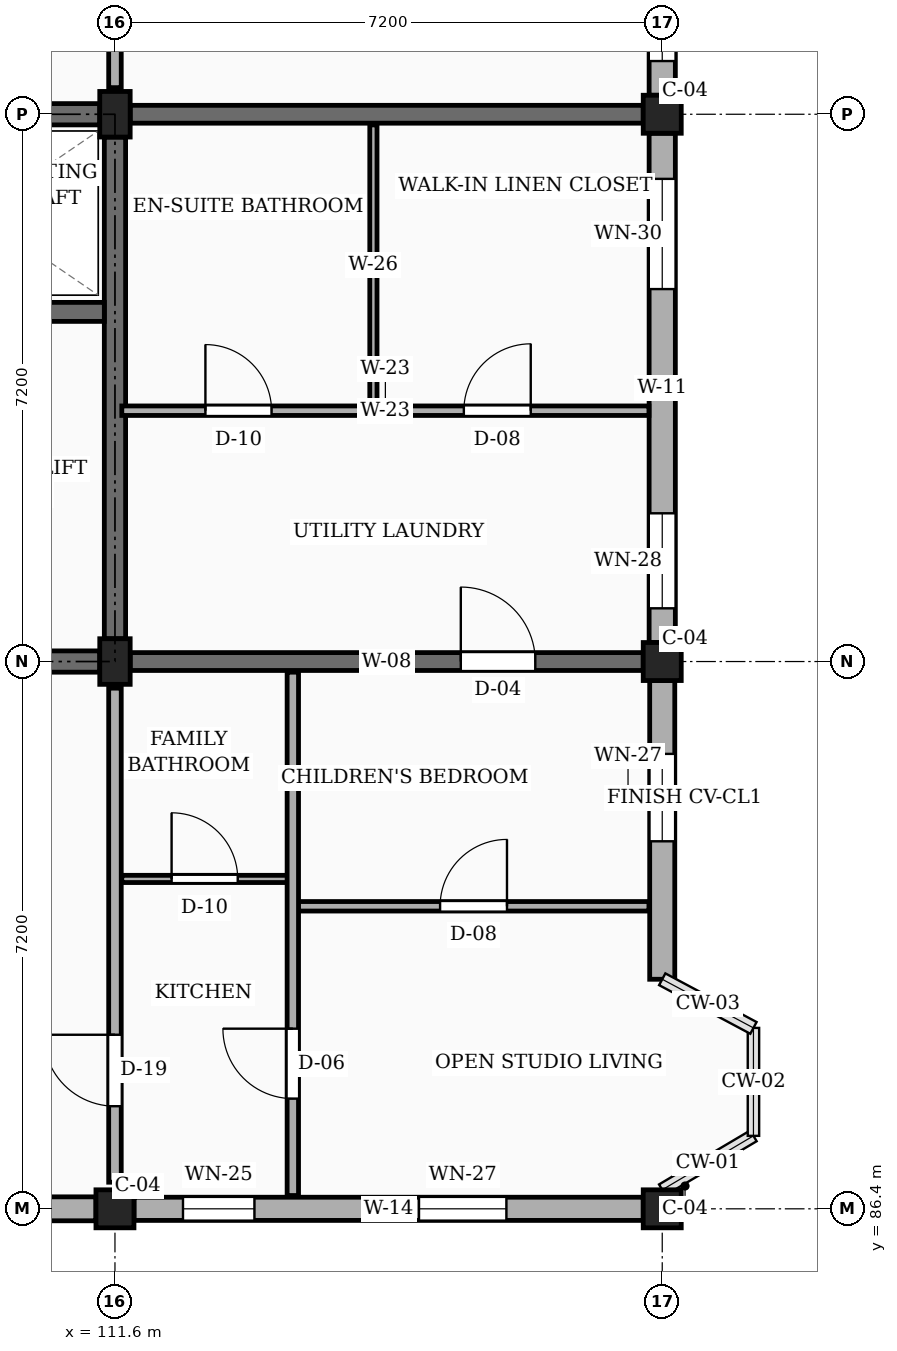
"""IFC4 building model, lengths in metres.
Left out: names, types, materials, properties, quantities, classifications, styles, units other than length and angle.
Written with IfcOpenShell. Run it as: python <this file> out.ifc"""

import sys

from ifc_helpers import new_model, si_unit, direction, frame, frame_2d, origin, origin_2d, place, context, subcontext, project, spatial, rectangle, extrude, element, fill, save


model = new_model("IFC4")
c1 = context("Model", 3, precision=1e-05, world=origin(), true_north=direction((0.0, 1.0)))
c2 = subcontext(c1, "Body", "Model", "MODEL_VIEW")
j1 = project(units=[si_unit("LENGTHUNIT", "METRE"), si_unit("PLANEANGLEUNIT", "RADIAN")], contexts=[c1])
p1 = place(None, origin())
s1 = spatial("IfcSite", under=j1, at=p1, CompositionType="ELEMENT")
p2 = place(p1, origin())
s2 = spatial("IfcBuilding", under=s1, at=p2, CompositionType="ELEMENT")
p3 = place(p2, frame((0.0, 0.0, 23.4)))
s3 = spatial("IfcBuildingStorey", under=s2, at=p3, CompositionType="ELEMENT", Elevation=23.4)
p4 = place(p3, frame((111.6, 86.4, 0.0), z_axis=(0.0, 0.0, 1.0), x_axis=(1.0, 0.0, 0.0)))
e1 = element("IfcColumn", 1, at=p4, inside=s3, PredefinedType="COLUMN", context=c2, shape_type="SweptSolid", body=[
    extrude(rectangle(XDim=0.5, YDim=0.5, at=origin_2d()), origin(), (0.0, 0.0, 1.0), 3.15),
])
for number, where, z_axis, x_axis in (
    (2, (111.6, 93.6, 0.0), (0.0, 0.0, 1.0), (1.0, 0.0, 0.0)),
    (3, (111.6, 100.8, 0.0), (0.0, 0.0, 1.0), (1.0, 0.0, 0.0)),
):
    element("IfcColumn", number, at=place(p3, frame(where, z_axis=z_axis, x_axis=x_axis)), inside=s3, PredefinedType="COLUMN", context=c2, shape_type="SweptSolid", body=[
        extrude(rectangle(XDim=0.4, YDim=0.6, at=origin_2d()), origin(), (0.0, 0.0, 1.0), 3.15),
    ])
for number, where, z_axis, x_axis in (
    (4, (118.8, 86.4, 0.0), (0.0, 0.0, 1.0), (1.0, 0.0, 0.0)),
    (5, (118.8, 93.6, 0.0), (0.0, 0.0, 1.0), (1.0, 0.0, 0.0)),
    (6, (118.8, 100.8, 0.0), (0.0, 0.0, 1.0), (1.0, 0.0, 0.0)),
):
    element("IfcColumn", number, at=place(p3, frame(where, z_axis=z_axis, x_axis=x_axis)), inside=s3, PredefinedType="COLUMN", context=c2, shape_type="SweptSolid", body=[
        extrude(rectangle(XDim=0.5, YDim=0.5, at=origin_2d()), origin(), (0.0, 0.0, 1.0), 3.15),
    ])
p5 = place(p3, frame((111.8, 93.6, 0.0), z_axis=(0.0, 0.0, 1.0), x_axis=(1.0, 0.0, 0.0)))
e7 = element("IfcWall", 7, at=p5, inside=s3, PredefinedType="SOLIDWALL", context=c2, shape_type="SweptSolid", body=[
    extrude(rectangle(XDim=6.75, YDim=0.235, at=frame_2d((3.375, 0.0))), origin(), (0.0, 0.0, 1.0), 2.19),
])
p6 = place(p5, frame((4.35, 0.0, 0.0)))
e8 = element("IfcOpeningElement", 8, at=p6, cuts=e7, PredefinedType="OPENING", context=c2, shape_type="SweptSolid", body=[
    extrude(rectangle(XDim=0.98, YDim=2.12, at=frame_2d((0.49, 1.06))), frame((0.0, 0.127, 0.0), z_axis=(0.0, -1.0, 0.0), x_axis=(1.0, 0.0, 0.0)), (0.0, 0.0, 1.0), 0.255),
])
p7 = place(p3, frame((111.8, 100.8, 0.0), z_axis=(0.0, 0.0, 1.0), x_axis=(1.0, 0.0, 0.0)))
e9 = element("IfcWall", 9, at=p7, inside=s3, PredefinedType="SOLIDWALL", context=c2, shape_type="SweptSolid", body=[
    extrude(rectangle(XDim=6.75, YDim=0.235, at=frame_2d((3.375, 0.0))), origin(), (0.0, 0.0, 1.0), 2.19),
])
p8 = place(p3, frame((104.65, 86.4, 0.0), z_axis=(0.0, 0.0, 1.0), x_axis=(1.0, 0.0, 0.0)))
e10 = element("IfcWall", 10, at=p8, inside=s3, PredefinedType="SOLIDWALL", context=c2, shape_type="SweptSolid", body=[
    extrude(rectangle(XDim=6.7, YDim=0.315, at=frame_2d((3.35, 0.0))), origin(), (0.0, 0.0, 1.0), 2.46),
])
p9 = place(p8, frame((0.45, 0.0, 0.78)))
e11 = element("IfcOpeningElement", 11, at=p9, cuts=e10, PredefinedType="OPENING", context=c2, shape_type="SweptSolid", body=[
    extrude(rectangle(XDim=1.38, YDim=1.36, at=frame_2d((0.69, 0.68))), frame((0.0, 0.167, 0.0), z_axis=(0.0, -1.0, 0.0), x_axis=(1.0, 0.0, 0.0)), (0.0, 0.0, 1.0), 0.335),
])
p10 = place(p8, frame((4.65, 0.0, 0.78)))
e12 = element("IfcOpeningElement", 12, at=p10, cuts=e10, PredefinedType="OPENING", context=c2, shape_type="SweptSolid", body=[
    extrude(rectangle(XDim=0.94, YDim=1.44, at=frame_2d((0.47, 0.72))), frame((0.0, 0.167, 0.0), z_axis=(0.0, -1.0, 0.0), x_axis=(1.0, 0.0, 0.0)), (0.0, 0.0, 1.0), 0.335),
])
p11 = place(p3, frame((111.85, 86.4, 0.0), z_axis=(0.0, 0.0, 1.0), x_axis=(1.0, 0.0, 0.0)))
e13 = element("IfcWall", 13, at=p11, inside=s3, PredefinedType="SOLIDWALL", context=c2, shape_type="SweptSolid", body=[
    extrude(rectangle(XDim=6.7, YDim=0.305, at=frame_2d((3.35, 0.0))), origin(), (0.0, 0.0, 1.0), 2.46),
])
p12 = place(p11, frame((0.645, 0.0, 0.78)))
e14 = element("IfcOpeningElement", 14, at=p12, cuts=e13, PredefinedType="OPENING", context=c2, shape_type="SweptSolid", body=[
    extrude(rectangle(XDim=0.94, YDim=1.44, at=frame_2d((0.47, 0.72))), frame((0.0, 0.163, 0.0), z_axis=(0.0, -1.0, 0.0), x_axis=(1.0, 0.0, 0.0)), (0.0, 0.0, 1.0), 0.325),
])
p13 = place(p11, frame((3.75, 0.0, 0.78)))
e15 = element("IfcOpeningElement", 15, at=p13, cuts=e13, PredefinedType="OPENING", context=c2, shape_type="SweptSolid", body=[
    extrude(rectangle(XDim=1.15, YDim=1.44, at=frame_2d((0.575, 0.72))), frame((0.0, 0.163, 0.0), z_axis=(0.0, -1.0, 0.0), x_axis=(1.0, 0.0, 0.0)), (0.0, 0.0, 1.0), 0.325),
])
p14 = place(p3, frame((118.8, 89.42, 0.0), z_axis=(0.0, 0.0, 1.0), x_axis=(0.0, 1.0, 0.0)))
e16 = element("IfcWall", 16, at=p14, inside=s3, PredefinedType="SOLIDWALL", context=c2, shape_type="SweptSolid", body=[
    extrude(rectangle(XDim=3.93, YDim=0.33, at=frame_2d((1.965, 0.0))), origin(), (0.0, 0.0, 1.0), 2.46),
])
p15 = place(p14, frame((1.815, 0.0, 0.78)))
e17 = element("IfcOpeningElement", 17, at=p15, cuts=e16, PredefinedType="OPENING", context=c2, shape_type="SweptSolid", body=[
    extrude(rectangle(XDim=1.15, YDim=1.44, at=frame_2d((0.575, 0.72))), frame((0.0, 0.175, 0.0), z_axis=(0.0, -1.0, 0.0), x_axis=(1.0, 0.0, 0.0)), (0.0, 0.0, 1.0), 0.35),
])
p16 = place(p3, frame((118.8, 93.85, 0.0), z_axis=(0.0, 0.0, 1.0), x_axis=(0.0, 1.0, 0.0)))
e18 = element("IfcWall", 18, at=p16, inside=s3, PredefinedType="SOLIDWALL", context=c2, shape_type="SweptSolid", body=[
    extrude(rectangle(XDim=6.7, YDim=0.345, at=frame_2d((3.35, 0.0))), origin(), (0.0, 0.0, 1.0), 2.46),
])
p17 = place(p16, frame((0.45, 0.0, 0.78)))
e19 = element("IfcOpeningElement", 19, at=p17, cuts=e18, PredefinedType="OPENING", context=c2, shape_type="SweptSolid", body=[
    extrude(rectangle(XDim=1.25, YDim=1.44, at=frame_2d((0.625, 0.72))), frame((0.0, 0.183, 0.0), z_axis=(0.0, -1.0, 0.0), x_axis=(1.0, 0.0, 0.0)), (0.0, 0.0, 1.0), 0.365),
])
p18 = place(p16, frame((4.65, 0.0, 0.78)))
e20 = element("IfcOpeningElement", 20, at=p18, cuts=e18, PredefinedType="OPENING", context=c2, shape_type="SweptSolid", body=[
    extrude(rectangle(XDim=1.45, YDim=1.44, at=frame_2d((0.725, 0.72))), frame((0.0, 0.183, 0.0), z_axis=(0.0, -1.0, 0.0), x_axis=(1.0, 0.0, 0.0)), (0.0, 0.0, 1.0), 0.365),
])
p19 = place(p3, frame((118.8, 101.05, 0.0), z_axis=(0.0, 0.0, 1.0), x_axis=(0.0, 1.0, 0.0)))
e21 = element("IfcWall", 21, at=p19, inside=s3, PredefinedType="SOLIDWALL", context=c2, shape_type="SweptSolid", body=[
    extrude(rectangle(XDim=6.7, YDim=0.345, at=frame_2d((3.35, 0.0))), origin(), (0.0, 0.0, 1.0), 2.46),
])
p20 = place(p19, frame((0.45, 0.0, 0.78)))
e22 = element("IfcOpeningElement", 22, at=p20, cuts=e21, PredefinedType="OPENING", context=c2, shape_type="SweptSolid", body=[
    extrude(rectangle(XDim=1.45, YDim=1.44, at=frame_2d((0.725, 0.72))), frame((0.0, 0.183, 0.0), z_axis=(0.0, -1.0, 0.0), x_axis=(1.0, 0.0, 0.0)), (0.0, 0.0, 1.0), 0.365),
])
p21 = place(p19, frame((4.65, 0.0, 0.78)))
e23 = element("IfcOpeningElement", 23, at=p21, cuts=e21, PredefinedType="OPENING", context=c2, shape_type="SweptSolid", body=[
    extrude(rectangle(XDim=0.92, YDim=1.15, at=frame_2d((0.46, 0.575))), frame((0.0, 0.183, 0.0), z_axis=(0.0, -1.0, 0.0), x_axis=(1.0, 0.0, 0.0)), (0.0, 0.0, 1.0), 0.365),
])
p22 = place(p3, frame((104.6, 100.8, 0.0), z_axis=(0.0, 0.0, 1.0), x_axis=(1.0, 0.0, 0.0)))
e24 = element("IfcWall", 24, at=p22, inside=s3, PredefinedType="SHEAR", context=c2, shape_type="SweptSolid", body=[
    extrude(rectangle(XDim=6.8, YDim=0.28, at=frame_2d((3.4, 0.0))), origin(), (0.0, 0.0, 1.0), 2.89),
])
p23 = place(p3, frame((111.6, 93.9, 0.0), z_axis=(0.0, 0.0, 1.0), x_axis=(0.0, 1.0, 0.0)))
e25 = element("IfcWall", 25, at=p23, inside=s3, PredefinedType="SHEAR", context=c2, shape_type="SweptSolid", body=[
    extrude(rectangle(XDim=6.6, YDim=0.28, at=frame_2d((3.3, 0.0))), origin(), (0.0, 0.0, 1.0), 2.89),
])
p24 = place(p3, frame((104.6, 93.6, 0.0), z_axis=(0.0, 0.0, 1.0), x_axis=(1.0, 0.0, 0.0)))
e26 = element("IfcWall", 26, at=p24, inside=s3, PredefinedType="SHEAR", context=c2, shape_type="SweptSolid", body=[
    extrude(rectangle(XDim=6.8, YDim=0.28, at=frame_2d((3.4, 0.0))), origin(), (0.0, 0.0, 1.0), 2.89),
])
p25 = place(p24, frame((4.55, 0.0, 0.0)))
e27 = element("IfcOpeningElement", 27, at=p25, cuts=e26, PredefinedType="OPENING", context=c2, shape_type="SweptSolid", body=[
    extrude(rectangle(XDim=1.1, YDim=2.15, at=frame_2d((0.55, 1.075))), frame((0.0, 0.15, 0.0), z_axis=(0.0, -1.0, 0.0), x_axis=(1.0, 0.0, 0.0)), (0.0, 0.0, 1.0), 0.3),
])
p26 = place(p3, frame((108.125, 98.2, 0.0), z_axis=(0.0, 0.0, 1.0), x_axis=(1.0, 0.0, 0.0)))
e28 = element("IfcWall", 28, at=p26, inside=s3, PredefinedType="SHEAR", context=c2, shape_type="SweptSolid", body=[
    extrude(rectangle(XDim=3.335, YDim=0.25, at=frame_2d((1.667, 0.0))), origin(), (0.0, 0.0, 1.0), 2.89),
])
p27 = place(p26, frame((1.1, 0.0, 0.0)))
e29 = element("IfcOpeningElement", 29, at=p27, cuts=e28, PredefinedType="OPENING", context=c2, shape_type="SweptSolid", body=[
    extrude(rectangle(XDim=1.1, YDim=2.2, at=frame_2d((0.55, 1.1))), frame((0.0, 0.135, 0.0), z_axis=(0.0, -1.0, 0.0), x_axis=(1.0, 0.0, 0.0)), (0.0, 0.0, 1.0), 0.27),
])
p28 = place(p3, frame((111.6, 86.75, 0.0), z_axis=(0.0, 0.0, 1.0), x_axis=(0.0, 1.0, 0.0)))
e30 = element("IfcWall", 30, at=p28, inside=s3, PredefinedType="PARTITIONING", context=c2, shape_type="SweptSolid", body=[
    extrude(rectangle(XDim=6.5, YDim=0.165, at=frame_2d((3.25, 0.0))), origin(), (0.0, 0.0, 1.0), 2.325),
])
p29 = place(p28, frame((1.0, 0.0, 0.0)))
e31 = element("IfcOpeningElement", 31, at=p29, cuts=e30, PredefinedType="OPENING", context=c2, shape_type="SweptSolid", body=[
    extrude(rectangle(XDim=0.94, YDim=2.12, at=frame_2d((0.47, 1.06))), frame((0.0, 0.093, 0.0), z_axis=(0.0, -1.0, 0.0), x_axis=(1.0, 0.0, 0.0)), (0.0, 0.0, 1.0), 0.185),
])
p30 = place(p3, frame((111.6, 101.15, 0.0), z_axis=(0.0, 0.0, 1.0), x_axis=(0.0, 1.0, 0.0)))
e32 = element("IfcWall", 32, at=p30, inside=s3, PredefinedType="PARTITIONING", context=c2, shape_type="SweptSolid", body=[
    extrude(rectangle(XDim=6.5, YDim=0.165, at=frame_2d((3.25, 0.0))), origin(), (0.0, 0.0, 1.0), 2.325),
])
p31 = place(p30, frame((1.1, 0.0, 0.0)))
e33 = element("IfcOpeningElement", 33, at=p31, cuts=e32, PredefinedType="OPENING", context=c2, shape_type="SweptSolid", body=[
    extrude(rectangle(XDim=1.14, YDim=2.18, at=frame_2d((0.57, 1.09))), frame((0.0, 0.093, 0.0), z_axis=(0.0, -1.0, 0.0), x_axis=(1.0, 0.0, 0.0)), (0.0, 0.0, 1.0), 0.185),
])
p32 = place(p3, frame((114.01, 90.38, 0.0), z_axis=(0.0, 0.0, 1.0), x_axis=(1.0, 0.0, 0.0)))
e34 = element("IfcWall", 34, at=p32, inside=s3, PredefinedType="PARTITIONING", context=c2, shape_type="SweptSolid", body=[
    extrude(rectangle(XDim=4.615, YDim=0.125, at=frame_2d((2.308, 0.0))), origin(), (0.0, 0.0, 1.0), 2.325),
])
p33 = place(p32, frame((1.867, 0.0, 0.0)))
e35 = element("IfcOpeningElement", 35, at=p33, cuts=e34, PredefinedType="OPENING", context=c2, shape_type="SweptSolid", body=[
    extrude(rectangle(XDim=0.88, YDim=2.08, at=frame_2d((0.44, 1.04))), frame((0.0, 0.073, 0.0), z_axis=(0.0, -1.0, 0.0), x_axis=(1.0, 0.0, 0.0)), (0.0, 0.0, 1.0), 0.145),
])
p34 = place(p3, frame((111.69, 90.74, 0.0), z_axis=(0.0, 0.0, 1.0), x_axis=(1.0, 0.0, 0.0)))
e36 = element("IfcWall", 36, at=p34, inside=s3, PredefinedType="PARTITIONING", context=c2, shape_type="SweptSolid", body=[
    extrude(rectangle(XDim=2.18, YDim=0.095, at=frame_2d((1.09, 0.0))), origin(), (0.0, 0.0, 1.0), 2.325),
])
p35 = place(p34, frame((0.655, 0.0, 0.0)))
e37 = element("IfcOpeningElement", 37, at=p35, cuts=e36, PredefinedType="OPENING", context=c2, shape_type="SweptSolid", body=[
    extrude(rectangle(XDim=0.87, YDim=2.05, at=frame_2d((0.435, 1.025))), frame((0.0, 0.058, 0.0), z_axis=(0.0, -1.0, 0.0), x_axis=(1.0, 0.0, 0.0)), (0.0, 0.0, 1.0), 0.115),
])
p36 = place(p3, frame((113.94, 86.575, 0.0), z_axis=(0.0, 0.0, 1.0), x_axis=(0.0, 1.0, 0.0)))
e38 = element("IfcWall", 38, at=p36, inside=s3, PredefinedType="PARTITIONING", context=c2, shape_type="SweptSolid", body=[
    extrude(rectangle(XDim=6.885, YDim=0.15, at=frame_2d((3.442, 0.0))), origin(), (0.0, 0.0, 1.0), 2.325),
])
p37 = place(p36, frame((1.275, 0.0, 0.0)))
e39 = element("IfcOpeningElement", 39, at=p37, cuts=e38, PredefinedType="OPENING", context=c2, shape_type="SweptSolid", body=[
    extrude(rectangle(XDim=0.92, YDim=2.1, at=frame_2d((0.46, 1.05))), frame((0.0, 0.085, 0.0), z_axis=(0.0, -1.0, 0.0), x_axis=(1.0, 0.0, 0.0)), (0.0, 0.0, 1.0), 0.17),
])
p38 = place(p3, frame((111.69, 96.9, 0.0), z_axis=(0.0, 0.0, 1.0), x_axis=(1.0, 0.0, 0.0)))
e40 = element("IfcWall", 40, at=p38, inside=s3, PredefinedType="PARTITIONING", context=c2, shape_type="SweptSolid", body=[
    extrude(rectangle(XDim=6.935, YDim=0.125, at=frame_2d((3.468, 0.0))), origin(), (0.0, 0.0, 1.0), 2.325),
])
p39 = place(p38, frame((1.1, 0.0, 0.0)))
e41 = element("IfcOpeningElement", 41, at=p39, cuts=e40, PredefinedType="OPENING", context=c2, shape_type="SweptSolid", body=[
    extrude(rectangle(XDim=0.87, YDim=2.05, at=frame_2d((0.435, 1.025))), frame((0.0, 0.073, 0.0), z_axis=(0.0, -1.0, 0.0), x_axis=(1.0, 0.0, 0.0)), (0.0, 0.0, 1.0), 0.145),
])
p40 = place(p38, frame((4.5, 0.0, 0.0)))
e42 = element("IfcOpeningElement", 42, at=p40, cuts=e40, PredefinedType="OPENING", context=c2, shape_type="SweptSolid", body=[
    extrude(rectangle(XDim=0.88, YDim=2.08, at=frame_2d((0.44, 1.04))), frame((0.0, 0.073, 0.0), z_axis=(0.0, -1.0, 0.0), x_axis=(1.0, 0.0, 0.0)), (0.0, 0.0, 1.0), 0.145),
])
p41 = place(p3, frame((115.0, 96.97, 0.0), z_axis=(0.0, 0.0, 1.0), x_axis=(0.0, 1.0, 0.0)))
e43 = element("IfcWall", 43, at=p41, inside=s3, PredefinedType="PARTITIONING", context=c2, shape_type="SweptSolid", body=[
    extrude(rectangle(XDim=3.69, YDim=0.095, at=frame_2d((1.845, 0.0))), origin(), (0.0, 0.0, 1.0), 2.325),
])
p42 = place(p12, origin())
e44 = element("IfcWindow", 44, at=p42, inside=s3, PartitioningType="SINGLE_PANEL", PredefinedType="WINDOW", context=c2, shape_type="SweptSolid", body=[
    extrude(rectangle(XDim=0.94, YDim=1.44, at=frame_2d((0.47, 0.72))), frame((0.0, 0.03, 0.0), z_axis=(0.0, -1.0, 0.0), x_axis=(1.0, 0.0, 0.0)), (0.0, 0.0, 1.0), 0.06),
])
fill(e14, e44)
p43 = place(p13, origin())
e45 = element("IfcWindow", 45, at=p43, inside=s3, PartitioningType="SINGLE_PANEL", PredefinedType="WINDOW", context=c2, shape_type="SweptSolid", body=[
    extrude(rectangle(XDim=1.15, YDim=1.44, at=frame_2d((0.575, 0.72))), frame((0.0, 0.03, 0.0), z_axis=(0.0, -1.0, 0.0), x_axis=(1.0, 0.0, 0.0)), (0.0, 0.0, 1.0), 0.06),
])
fill(e15, e45)
p44 = place(p15, origin())
e46 = element("IfcWindow", 46, at=p44, inside=s3, PartitioningType="SINGLE_PANEL", PredefinedType="WINDOW", context=c2, shape_type="SweptSolid", body=[
    extrude(rectangle(XDim=1.15, YDim=1.44, at=frame_2d((0.575, 0.72))), frame((0.0, 0.03, 0.0), z_axis=(0.0, -1.0, 0.0), x_axis=(1.0, 0.0, 0.0)), (0.0, 0.0, 1.0), 0.06),
])
fill(e17, e46)
p45 = place(p17, origin())
e47 = element("IfcWindow", 47, at=p45, inside=s3, PartitioningType="SINGLE_PANEL", PredefinedType="WINDOW", context=c2, shape_type="SweptSolid", body=[
    extrude(rectangle(XDim=1.25, YDim=1.44, at=frame_2d((0.625, 0.72))), frame((0.0, 0.03, 0.0), z_axis=(0.0, -1.0, 0.0), x_axis=(1.0, 0.0, 0.0)), (0.0, 0.0, 1.0), 0.06),
])
fill(e19, e47)
p46 = place(p18, origin())
e48 = element("IfcWindow", 48, at=p46, inside=s3, PartitioningType="SINGLE_PANEL", PredefinedType="WINDOW", context=c2, shape_type="SweptSolid", body=[
    extrude(rectangle(XDim=1.45, YDim=1.44, at=frame_2d((0.725, 0.72))), frame((0.0, 0.03, 0.0), z_axis=(0.0, -1.0, 0.0), x_axis=(1.0, 0.0, 0.0)), (0.0, 0.0, 1.0), 0.06),
])
fill(e20, e48)
p47 = place(p20, origin())
e49 = element("IfcWindow", 49, at=p47, inside=s3, PartitioningType="SINGLE_PANEL", PredefinedType="WINDOW", context=c2, shape_type="SweptSolid", body=[
    extrude(rectangle(XDim=1.45, YDim=1.44, at=frame_2d((0.725, 0.72))), frame((0.0, 0.03, 0.0), z_axis=(0.0, -1.0, 0.0), x_axis=(1.0, 0.0, 0.0)), (0.0, 0.0, 1.0), 0.06),
])
fill(e22, e49)
p48 = place(p29, origin())
e50 = element("IfcDoor", 50, at=p48, inside=s3, OperationType="SINGLE_SWING_RIGHT", PredefinedType="DOOR", context=c2, shape_type="SweptSolid", body=[
    extrude(rectangle(XDim=0.94, YDim=2.12, at=frame_2d((0.47, 1.06))), frame((0.0, 0.025, 0.0), z_axis=(0.0, -1.0, 0.0), x_axis=(1.0, 0.0, 0.0)), (0.0, 0.0, 1.0), 0.05),
])
fill(e31, e50)
p49 = place(p33, origin())
e51 = element("IfcDoor", 51, at=p49, inside=s3, OperationType="SINGLE_SWING_RIGHT", PredefinedType="DOOR", context=c2, shape_type="SweptSolid", body=[
    extrude(rectangle(XDim=0.88, YDim=2.08, at=frame_2d((0.44, 1.04))), frame((0.0, 0.025, 0.0), z_axis=(0.0, -1.0, 0.0), x_axis=(1.0, 0.0, 0.0)), (0.0, 0.0, 1.0), 0.05),
])
fill(e35, e51)
p50 = place(p35, origin())
e52 = element("IfcDoor", 52, at=p50, inside=s3, OperationType="SINGLE_SWING_LEFT", PredefinedType="DOOR", context=c2, shape_type="SweptSolid", body=[
    extrude(rectangle(XDim=0.87, YDim=2.05, at=frame_2d((0.435, 1.025))), frame((0.0, 0.025, 0.0), z_axis=(0.0, -1.0, 0.0), x_axis=(1.0, 0.0, 0.0)), (0.0, 0.0, 1.0), 0.05),
])
fill(e37, e52)
p51 = place(p37, origin())
e53 = element("IfcDoor", 53, at=p51, inside=s3, OperationType="SINGLE_SWING_RIGHT", PredefinedType="DOOR", context=c2, shape_type="SweptSolid", body=[
    extrude(rectangle(XDim=0.92, YDim=2.1, at=frame_2d((0.46, 1.05))), frame((0.0, 0.025, 0.0), z_axis=(0.0, -1.0, 0.0), x_axis=(1.0, 0.0, 0.0)), (0.0, 0.0, 1.0), 0.05),
])
fill(e39, e53)
p52 = place(p39, origin())
e54 = element("IfcDoor", 54, at=p52, inside=s3, OperationType="SINGLE_SWING_LEFT", PredefinedType="DOOR", context=c2, shape_type="SweptSolid", body=[
    extrude(rectangle(XDim=0.87, YDim=2.05, at=frame_2d((0.435, 1.025))), frame((0.0, 0.025, 0.0), z_axis=(0.0, -1.0, 0.0), x_axis=(1.0, 0.0, 0.0)), (0.0, 0.0, 1.0), 0.05),
])
fill(e41, e54)
p53 = place(p40, origin())
e55 = element("IfcDoor", 55, at=p53, inside=s3, OperationType="SINGLE_SWING_RIGHT", PredefinedType="DOOR", context=c2, shape_type="SweptSolid", body=[
    extrude(rectangle(XDim=0.88, YDim=2.08, at=frame_2d((0.44, 1.04))), frame((0.0, 0.025, 0.0), z_axis=(0.0, -1.0, 0.0), x_axis=(1.0, 0.0, 0.0)), (0.0, 0.0, 1.0), 0.05),
])
fill(e42, e55)
p54 = place(p6, origin())
e56 = element("IfcDoor", 56, at=p54, inside=s3, OperationType="SINGLE_SWING_LEFT", PredefinedType="DOOR", context=c2, shape_type="SweptSolid", body=[
    extrude(rectangle(XDim=0.98, YDim=2.12, at=frame_2d((0.49, 1.06))), frame((0.0, 0.025, 0.0), z_axis=(0.0, -1.0, 0.0), x_axis=(1.0, 0.0, 0.0)), (0.0, 0.0, 1.0), 0.05),
])
fill(e8, e56)
save(model, sys.argv[1])
